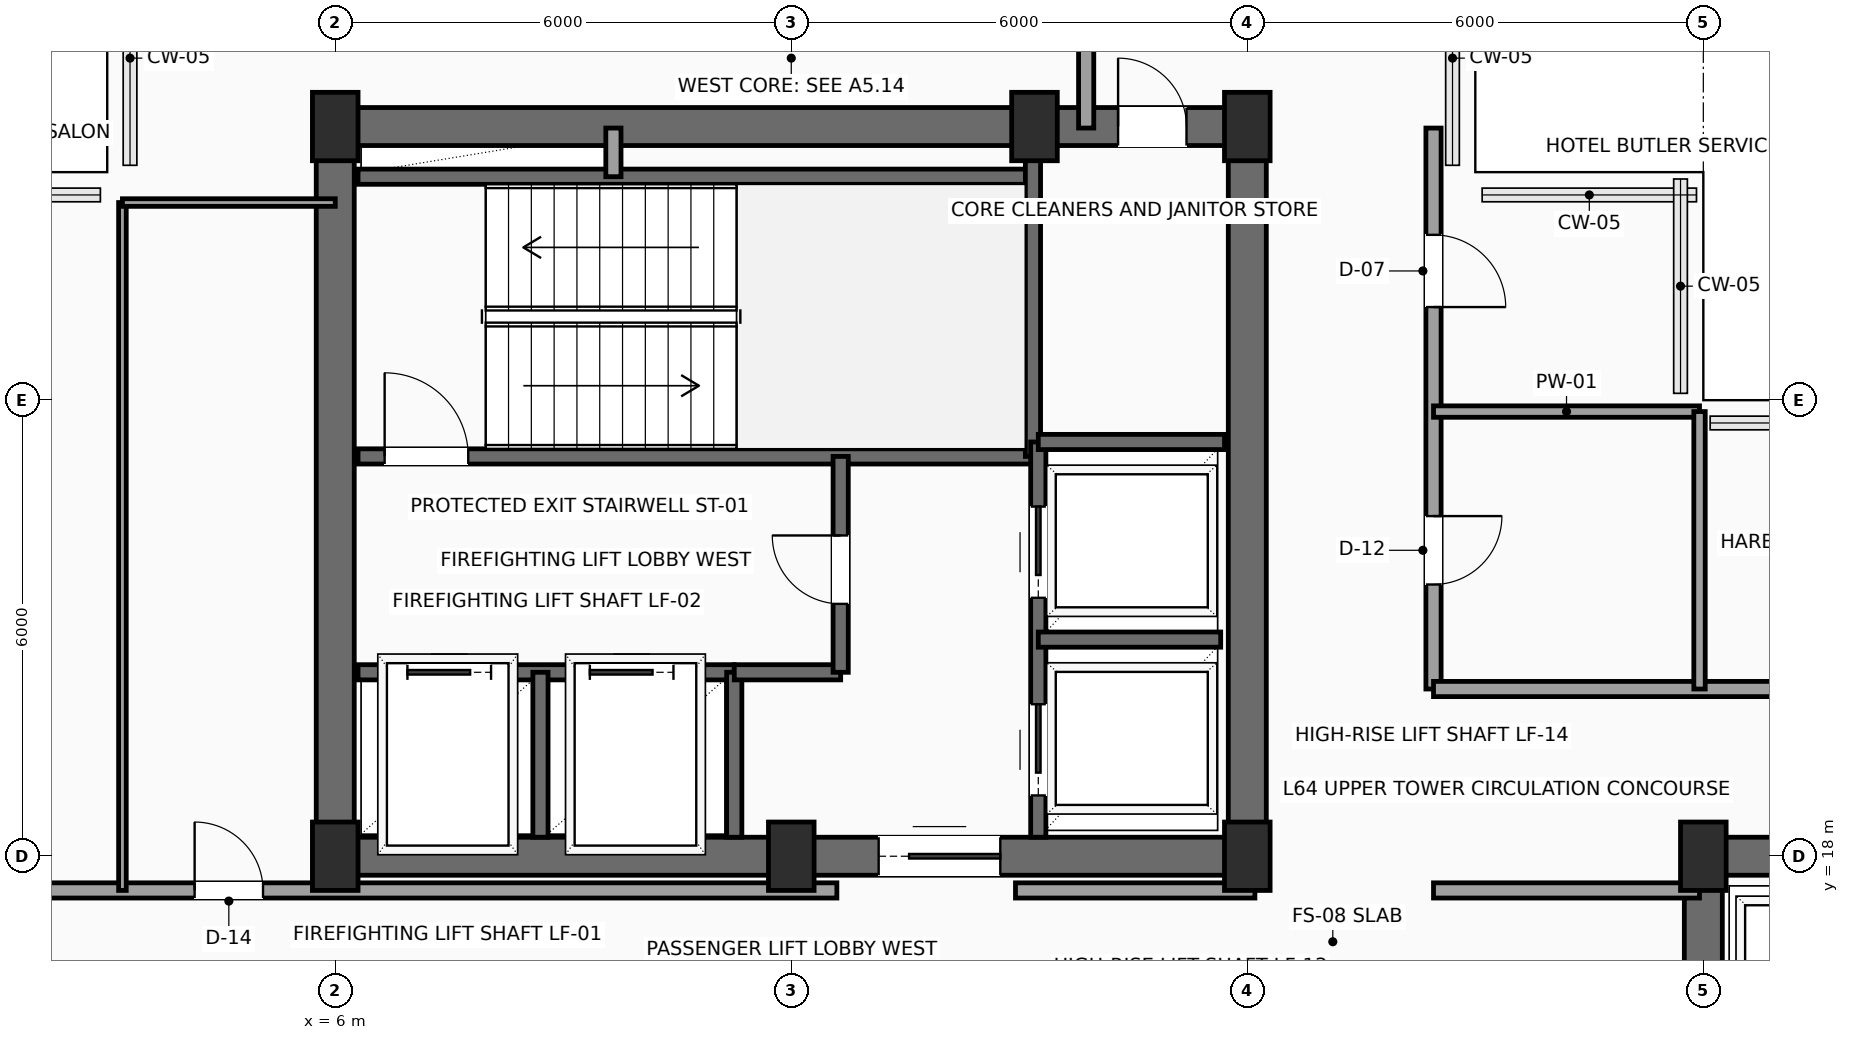
"""IFC4 building model, lengths in metres.
Left out: names, types, materials, properties, quantities, classifications, styles, units other than length and angle.
Written with IfcOpenShell. Run it as: python <this file> out.ifc"""

import sys

from ifc_helpers import new_model, si_unit, direction, frame, frame_2d, origin, origin_2d, place, context, subcontext, project, spatial, rectangle, extrude, element, fill, save


model = new_model("IFC4")
c1 = context("Model", 3, precision=1e-05, world=origin(), true_north=direction((0.0, 1.0)))
c2 = subcontext(c1, "Body", "Model", "MODEL_VIEW")
j1 = project(units=[si_unit("LENGTHUNIT", "METRE"), si_unit("PLANEANGLEUNIT", "RADIAN")], contexts=[c1])
p1 = place(None, origin())
s1 = spatial("IfcSite", under=j1, at=p1, CompositionType="ELEMENT")
p2 = place(p1, origin())
s2 = spatial("IfcBuilding", under=s1, at=p2, CompositionType="ELEMENT")
p3 = place(p2, frame((0.0, 0.0, 257.2)))
s3 = spatial("IfcBuildingStorey", under=s2, at=p3, CompositionType="ELEMENT", Elevation=257.2)
for number, where, z_axis, x_axis in (
    (1, (6.0, 18.0, 0.0), (0.0, 0.0, 1.0), (1.0, 0.0, 0.0)),
    (2, (12.0, 18.0, 0.0), (0.0, 0.0, 1.0), (1.0, 0.0, 0.0)),
    (3, (18.0, 18.0, 0.0), (0.0, 0.0, 1.0), (1.0, 0.0, 0.0)),
    (4, (6.0, 27.6, 0.0), (0.0, 0.0, 1.0), (1.0, 0.0, 0.0)),
    (5, (15.2, 27.6, 0.0), (0.0, 0.0, 1.0), (1.0, 0.0, 0.0)),
    (6, (18.0, 27.6, 0.0), (0.0, 0.0, 1.0), (1.0, 0.0, 0.0)),
    (7, (24.0, 18.0, 0.0), (0.0, 0.0, 1.0), (1.0, 0.0, 0.0)),
):
    element("IfcColumn", number, at=place(p3, frame(where, z_axis=z_axis, x_axis=x_axis)), inside=s3, PredefinedType="COLUMN", context=c2, shape_type="SweptSolid", body=[
        extrude(rectangle(XDim=0.6, YDim=0.9, at=origin_2d()), origin(), (0.0, 0.0, 1.0), 3.5),
    ])
p4 = place(p3, frame((6.0, 18.0, 0.0), z_axis=(0.0, 0.0, 1.0), x_axis=(1.0, 0.0, 0.0)))
e8 = element("IfcWall", 8, at=p4, inside=s3, PredefinedType="SHEAR", context=c2, shape_type="SweptSolid", body=[
    extrude(rectangle(XDim=12.0, YDim=0.5, at=frame_2d((6.0, 0.0))), origin(), (0.0, 0.0, 1.0), 3.3),
])
p5 = place(p4, frame((7.15, 0.0, 0.0)))
e9 = element("IfcOpeningElement", 9, at=p5, cuts=e8, PredefinedType="OPENING", context=c2, shape_type="SweptSolid", body=[
    extrude(rectangle(XDim=1.6, YDim=2.3, at=frame_2d((0.8, 1.15))), frame((0.0, 0.26, 0.0), z_axis=(0.0, -1.0, 0.0), x_axis=(1.0, 0.0, 0.0)), (0.0, 0.0, 1.0), 0.52),
])
p6 = place(p3, frame((6.0, 27.6, 0.0), z_axis=(0.0, 0.0, 1.0), x_axis=(1.0, 0.0, 0.0)))
e10 = element("IfcWall", 10, at=p6, inside=s3, PredefinedType="SHEAR", context=c2, shape_type="SweptSolid", body=[
    extrude(rectangle(XDim=12.0, YDim=0.5, at=frame_2d((6.0, 0.0))), origin(), (0.0, 0.0, 1.0), 3.3),
])
p7 = place(p6, frame((10.3, 0.0, 0.0)))
e11 = element("IfcOpeningElement", 11, at=p7, cuts=e10, PredefinedType="OPENING", context=c2, shape_type="SweptSolid", body=[
    extrude(rectangle(XDim=0.9, YDim=2.15, at=frame_2d((0.45, 1.075))), frame((0.0, 0.26, 0.0), z_axis=(0.0, -1.0, 0.0), x_axis=(1.0, 0.0, 0.0)), (0.0, 0.0, 1.0), 0.52),
])
for number, where, z_axis, x_axis in (
    (12, (6.0, 18.0, 0.0), (0.0, 0.0, 1.0), (0.0, 1.0, 0.0)),
    (13, (18.0, 18.0, 0.0), (0.0, 0.0, 1.0), (0.0, 1.0, 0.0)),
    (14, (24.0, 18.0, 0.0), (0.0, 0.0, 1.0), (1.0, 0.0, 0.0)),
):
    element("IfcWall", number, at=place(p3, frame(where, z_axis=z_axis, x_axis=x_axis)), inside=s3, PredefinedType="SHEAR", context=c2, shape_type="SweptSolid", body=[
        extrude(rectangle(XDim=9.6, YDim=0.5, at=frame_2d((4.8, 0.0))), origin(), (0.0, 0.0, 1.0), 3.3),
    ])
p8 = place(p3, frame((24.0, 6.0, 0.0), z_axis=(0.0, 0.0, 1.0), x_axis=(0.0, 1.0, 0.0)))
e15 = element("IfcWall", 15, at=p8, inside=s3, PredefinedType="SHEAR", context=c2, shape_type="SweptSolid", body=[
    extrude(rectangle(XDim=12.0, YDim=0.5, at=frame_2d((6.0, 0.0))), origin(), (0.0, 0.0, 1.0), 3.3),
])
p9 = place(p8, frame((7.15, 0.0, 0.0)))
e16 = element("IfcOpeningElement", 16, at=p9, cuts=e15, PredefinedType="OPENING", context=c2, shape_type="SweptSolid", body=[
    extrude(rectangle(XDim=1.6, YDim=2.3, at=frame_2d((0.8, 1.15))), frame((0.0, 0.26, 0.0), z_axis=(0.0, -1.0, 0.0), x_axis=(1.0, 0.0, 0.0)), (0.0, 0.0, 1.0), 0.52),
])
p10 = place(p3, frame((6.3, 23.26, 0.0), z_axis=(0.0, 0.0, 1.0), x_axis=(1.0, 0.0, 0.0)))
e17 = element("IfcWall", 17, at=p10, inside=s3, PredefinedType="SHEAR", context=c2, shape_type="SweptSolid", body=[
    extrude(rectangle(XDim=8.88, YDim=0.2, at=frame_2d((4.44, 0.0))), origin(), (0.0, 0.0, 1.0), 3.3),
])
p11 = place(p10, frame((0.35, 0.0, 0.0)))
e18 = element("IfcOpeningElement", 18, at=p11, cuts=e17, PredefinedType="OPENING", context=c2, shape_type="SweptSolid", body=[
    extrude(rectangle(XDim=1.1, YDim=2.2, at=frame_2d((0.55, 1.1))), frame((0.0, 0.11, 0.0), z_axis=(0.0, -1.0, 0.0), x_axis=(1.0, 0.0, 0.0)), (0.0, 0.0, 1.0), 0.22),
])
p12 = place(p3, frame((6.3, 26.94, 0.0), z_axis=(0.0, 0.0, 1.0), x_axis=(1.0, 0.0, 0.0)))
e19 = element("IfcWall", 19, at=p12, inside=s3, PredefinedType="SHEAR", context=c2, shape_type="SweptSolid", body=[
    extrude(rectangle(XDim=8.88, YDim=0.2, at=frame_2d((4.44, 0.0))), origin(), (0.0, 0.0, 1.0), 3.3),
])
p13 = place(p3, frame((15.18, 23.26, 0.0), z_axis=(0.0, 0.0, 1.0), x_axis=(0.0, 1.0, 0.0)))
e20 = element("IfcWall", 20, at=p13, inside=s3, PredefinedType="SHEAR", context=c2, shape_type="SweptSolid", body=[
    extrude(rectangle(XDim=4.04, YDim=0.2, at=frame_2d((2.02, 0.0))), origin(), (0.0, 0.0, 1.0), 3.3),
])
p14 = place(p3, frame((6.3, 20.42, 0.0), z_axis=(0.0, 0.0, 1.0), x_axis=(1.0, 0.0, 0.0)))
e21 = element("IfcWall", 21, at=p14, inside=s3, PredefinedType="SHEAR", context=c2, shape_type="SweptSolid", body=[
    extrude(rectangle(XDim=4.95, YDim=0.2, at=frame_2d((2.475, 0.0))), origin(), (0.0, 0.0, 1.0), 3.3),
])
p15 = place(p14, frame((0.65, 0.0, 0.0)))
e22 = element("IfcOpeningElement", 22, at=p15, cuts=e21, PredefinedType="OPENING", context=c2, shape_type="SweptSolid", body=[
    extrude(rectangle(XDim=1.1, YDim=2.2, at=frame_2d((0.55, 1.1))), frame((0.0, 0.11, 0.0), z_axis=(0.0, -1.0, 0.0), x_axis=(1.0, 0.0, 0.0)), (0.0, 0.0, 1.0), 0.22),
])
p16 = place(p14, frame((3.05, 0.0, 0.0)))
e23 = element("IfcOpeningElement", 23, at=p16, cuts=e21, PredefinedType="OPENING", context=c2, shape_type="SweptSolid", body=[
    extrude(rectangle(XDim=1.1, YDim=2.2, at=frame_2d((0.55, 1.1))), frame((0.0, 0.11, 0.0), z_axis=(0.0, -1.0, 0.0), x_axis=(1.0, 0.0, 0.0)), (0.0, 0.0, 1.0), 0.22),
])
for number, where, z_axis, x_axis in (
    (24, (8.7, 18.25, 0.0), (0.0, 0.0, 1.0), (0.0, 1.0, 0.0)),
    (25, (11.25, 18.25, 0.0), (0.0, 0.0, 1.0), (0.0, 1.0, 0.0)),
):
    element("IfcWall", number, at=place(p3, frame(where, z_axis=z_axis, x_axis=x_axis)), inside=s3, PredefinedType="SHEAR", context=c2, shape_type="SweptSolid", body=[
        extrude(rectangle(XDim=2.17, YDim=0.2, at=frame_2d((1.085, 0.0))), origin(), (0.0, 0.0, 1.0), 3.3),
    ])
p17 = place(p3, frame((11.25, 20.42, 0.0), z_axis=(0.0, 0.0, 1.0), x_axis=(1.0, 0.0, 0.0)))
e26 = element("IfcWall", 26, at=p17, inside=s3, PredefinedType="SHEAR", context=c2, shape_type="SweptSolid", body=[
    extrude(rectangle(XDim=1.4, YDim=0.2, at=frame_2d((0.7, 0.0))), origin(), (0.0, 0.0, 1.0), 3.3),
])
p18 = place(p3, frame((12.65, 20.42, 0.0), z_axis=(0.0, 0.0, 1.0), x_axis=(0.0, 1.0, 0.0)))
e27 = element("IfcWall", 27, at=p18, inside=s3, PredefinedType="SHEAR", context=c2, shape_type="SweptSolid", body=[
    extrude(rectangle(XDim=2.84, YDim=0.2, at=frame_2d((1.42, 0.0))), origin(), (0.0, 0.0, 1.0), 3.3),
])
p19 = place(p18, frame((0.9, 0.0, 0.0)))
e28 = element("IfcOpeningElement", 28, at=p19, cuts=e27, PredefinedType="OPENING", context=c2, shape_type="SweptSolid", body=[
    extrude(rectangle(XDim=0.9, YDim=2.15, at=frame_2d((0.45, 1.075))), frame((0.0, 0.11, 0.0), z_axis=(0.0, -1.0, 0.0), x_axis=(1.0, 0.0, 0.0)), (0.0, 0.0, 1.0), 0.22),
])
p20 = place(p3, frame((9.66, 26.94, 0.0), z_axis=(0.0, 0.0, 1.0), x_axis=(0.0, 1.0, 0.0)))
e29 = element("IfcWall", 29, at=p20, inside=s3, PredefinedType="SOLIDWALL", context=c2, shape_type="SweptSolid", body=[
    extrude(rectangle(XDim=0.64, YDim=0.2, at=frame_2d((0.32, 0.0))), origin(), (0.0, 0.0, 1.0), 3.3),
])
p21 = place(p3, frame((15.25, 18.25, 0.0), z_axis=(0.0, 0.0, 1.0), x_axis=(0.0, 1.0, 0.0)))
e30 = element("IfcWall", 30, at=p21, inside=s3, PredefinedType="SHEAR", context=c2, shape_type="SweptSolid", body=[
    extrude(rectangle(XDim=5.2, YDim=0.2, at=frame_2d((2.6, 0.0))), origin(), (0.0, 0.0, 1.0), 3.3),
])
p22 = place(p21, frame((0.55, 0.0, 0.0)))
e31 = element("IfcOpeningElement", 31, at=p22, cuts=e30, PredefinedType="OPENING", context=c2, shape_type="SweptSolid", body=[
    extrude(rectangle(XDim=1.2, YDim=2.2, at=frame_2d((0.6, 1.1))), frame((0.0, 0.11, 0.0), z_axis=(0.0, -1.0, 0.0), x_axis=(1.0, 0.0, 0.0)), (0.0, 0.0, 1.0), 0.22),
])
p23 = place(p21, frame((3.15, 0.0, 0.0)))
e32 = element("IfcOpeningElement", 32, at=p23, cuts=e30, PredefinedType="OPENING", context=c2, shape_type="SweptSolid", body=[
    extrude(rectangle(XDim=1.2, YDim=2.2, at=frame_2d((0.6, 1.1))), frame((0.0, 0.11, 0.0), z_axis=(0.0, -1.0, 0.0), x_axis=(1.0, 0.0, 0.0)), (0.0, 0.0, 1.0), 0.22),
])
p24 = place(p3, frame((15.25, 20.85, 0.0), z_axis=(0.0, 0.0, 1.0), x_axis=(1.0, 0.0, 0.0)))
e33 = element("IfcWall", 33, at=p24, inside=s3, PredefinedType="SHEAR", context=c2, shape_type="SweptSolid", body=[
    extrude(rectangle(XDim=2.4, YDim=0.2, at=frame_2d((1.2, 0.0))), origin(), (0.0, 0.0, 1.0), 3.3),
])
p25 = place(p3, frame((15.25, 23.45, 0.0), z_axis=(0.0, 0.0, 1.0), x_axis=(1.0, 0.0, 0.0)))
e34 = element("IfcWall", 34, at=p25, inside=s3, PredefinedType="SHEAR", context=c2, shape_type="SweptSolid", body=[
    extrude(rectangle(XDim=2.45, YDim=0.2, at=frame_2d((1.225, 0.0))), origin(), (0.0, 0.0, 1.0), 3.3),
])
p26 = place(p3, frame((0.3, 17.55, 0.0), z_axis=(0.0, 0.0, 1.0), x_axis=(1.0, 0.0, 0.0)))
e35 = element("IfcWall", 35, at=p26, inside=s3, PredefinedType="SOLIDWALL", context=c2, shape_type="SweptSolid", body=[
    extrude(rectangle(XDim=12.3, YDim=0.2, at=frame_2d((6.15, 0.0))), origin(), (0.0, 0.0, 1.0), 3.3),
])
p27 = place(p26, frame((1.025, 0.0, 0.0)))
e36 = element("IfcOpeningElement", 36, at=p27, cuts=e35, PredefinedType="OPENING", context=c2, shape_type="SweptSolid", body=[
    extrude(rectangle(XDim=0.9, YDim=2.1, at=frame_2d((0.45, 1.05))), frame((0.0, 0.11, 0.0), z_axis=(0.0, -1.0, 0.0), x_axis=(1.0, 0.0, 0.0)), (0.0, 0.0, 1.0), 0.22),
])
p28 = place(p26, frame((3.85, 0.0, 0.0)))
e37 = element("IfcOpeningElement", 37, at=p28, cuts=e35, PredefinedType="OPENING", context=c2, shape_type="SweptSolid", body=[
    extrude(rectangle(XDim=0.9, YDim=2.1, at=frame_2d((0.45, 1.05))), frame((0.0, 0.11, 0.0), z_axis=(0.0, -1.0, 0.0), x_axis=(1.0, 0.0, 0.0)), (0.0, 0.0, 1.0), 0.22),
])
p29 = place(p3, frame((14.95, 17.55, 0.0), z_axis=(0.0, 0.0, 1.0), x_axis=(1.0, 0.0, 0.0)))
e38 = element("IfcWall", 38, at=p29, inside=s3, PredefinedType="SOLIDWALL", context=c2, shape_type="SweptSolid", body=[
    extrude(rectangle(XDim=3.15, YDim=0.2, at=frame_2d((1.575, 0.0))), origin(), (0.0, 0.0, 1.0), 3.3),
])
p30 = place(p3, frame((15.88, 27.58, 0.0), z_axis=(0.0, 0.0, 1.0), x_axis=(0.0, 1.0, 0.0)))
e39 = element("IfcWall", 39, at=p30, inside=s3, PredefinedType="SOLIDWALL", context=c2, shape_type="SweptSolid", body=[
    extrude(rectangle(XDim=2.12, YDim=0.2, at=frame_2d((1.06, 0.0))), origin(), (0.0, 0.0, 1.0), 3.3),
])
p31 = place(p3, frame((20.45, 27.58, 0.0), z_axis=(0.0, 0.0, 1.0), x_axis=(0.0, -1.0, 0.0)))
e40 = element("IfcWall", 40, at=p31, inside=s3, PredefinedType="SOLIDWALL", context=c2, shape_type="SweptSolid", body=[
    extrude(rectangle(XDim=7.38, YDim=0.2, at=frame_2d((3.69, 0.0))), origin(), (0.0, 0.0, 1.0), 3.3),
])
p32 = place(p31, frame((5.105, 0.0, 0.0)))
e41 = element("IfcOpeningElement", 41, at=p32, cuts=e40, PredefinedType="OPENING", context=c2, shape_type="SweptSolid", body=[
    extrude(rectangle(XDim=0.9, YDim=2.1, at=frame_2d((0.45, 1.05))), frame((0.0, 0.11, 0.0), z_axis=(0.0, -1.0, 0.0), x_axis=(1.0, 0.0, 0.0)), (0.0, 0.0, 1.0), 0.22),
])
p33 = place(p31, frame((1.405, 0.0, 0.0)))
e42 = element("IfcOpeningElement", 42, at=p33, cuts=e40, PredefinedType="OPENING", context=c2, shape_type="SweptSolid", body=[
    extrude(rectangle(XDim=0.95, YDim=2.15, at=frame_2d((0.475, 1.075))), frame((0.0, 0.11, 0.0), z_axis=(0.0, -1.0, 0.0), x_axis=(1.0, 0.0, 0.0)), (0.0, 0.0, 1.0), 0.22),
])
p34 = place(p3, frame((20.45, 20.2, 0.0), z_axis=(0.0, 0.0, 1.0), x_axis=(1.0, 0.0, 0.0)))
e43 = element("IfcWall", 43, at=p34, inside=s3, PredefinedType="SOLIDWALL", context=c2, shape_type="SweptSolid", body=[
    extrude(rectangle(XDim=13.13, YDim=0.2, at=frame_2d((6.565, 0.0))), origin(), (0.0, 0.0, 1.0), 3.3),
])
p35 = place(p34, frame((7.9, 0.0, 0.0)))
e44 = element("IfcOpeningElement", 44, at=p35, cuts=e43, PredefinedType="OPENING", context=c2, shape_type="SweptSolid", body=[
    extrude(rectangle(XDim=0.9, YDim=2.1, at=frame_2d((0.45, 1.05))), frame((0.0, 0.11, 0.0), z_axis=(0.0, -1.0, 0.0), x_axis=(1.0, 0.0, 0.0)), (0.0, 0.0, 1.0), 0.22),
])
p36 = place(p3, frame((20.45, 17.55, 0.0), z_axis=(0.0, 0.0, 1.0), x_axis=(1.0, 0.0, 0.0)))
e45 = element("IfcWall", 45, at=p36, inside=s3, PredefinedType="SOLIDWALL", context=c2, shape_type="SweptSolid", body=[
    extrude(rectangle(XDim=3.5, YDim=0.2, at=frame_2d((1.75, 0.0))), origin(), (0.0, 0.0, 1.0), 3.3),
])
p37 = place(p3, frame((20.45, 23.85, 0.0), z_axis=(0.0, 0.0, 1.0), x_axis=(1.0, 0.0, 0.0)))
e46 = element("IfcWall", 46, at=p37, inside=s3, PredefinedType="PARTITIONING", context=c2, shape_type="SweptSolid", body=[
    extrude(rectangle(XDim=3.5, YDim=0.15, at=frame_2d((1.75, 0.0))), origin(), (0.0, 0.0, 1.0), 3.3),
])
p38 = place(p3, frame((23.95, 20.2, 0.0), z_axis=(0.0, 0.0, 1.0), x_axis=(0.0, 1.0, 0.0)))
e47 = element("IfcWall", 47, at=p38, inside=s3, PredefinedType="PARTITIONING", context=c2, shape_type="SweptSolid", body=[
    extrude(rectangle(XDim=3.65, YDim=0.15, at=frame_2d((1.825, 0.0))), origin(), (0.0, 0.0, 1.0), 3.3),
])
p39 = place(p3, frame((3.2, 17.55, 0.0), z_axis=(0.0, 0.0, 1.0), x_axis=(0.0, 1.0, 0.0)))
e48 = element("IfcWall", 48, at=p39, inside=s3, PredefinedType="PARTITIONING", context=c2, shape_type="SweptSolid", body=[
    extrude(rectangle(XDim=9.05, YDim=0.1, at=frame_2d((4.525, 0.0))), origin(), (0.0, 0.0, 1.0), 3.3),
])
p40 = place(p3, frame((3.2, 26.6, 0.0), z_axis=(0.0, 0.0, 1.0), x_axis=(1.0, 0.0, 0.0)))
e49 = element("IfcWall", 49, at=p40, inside=s3, PredefinedType="PARTITIONING", context=c2, shape_type="SweptSolid", body=[
    extrude(rectangle(XDim=2.8, YDim=0.1, at=frame_2d((1.4, 0.0))), origin(), (0.0, 0.0, 1.0), 3.3),
])
p41 = place(p5, origin())
e50 = element("IfcDoor", 50, at=p41, inside=s3, OperationType="DOUBLE_DOOR_SLIDING", PredefinedType="DOOR", context=c2, shape_type="SweptSolid", body=[
    extrude(rectangle(XDim=1.6, YDim=2.3, at=frame_2d((0.8, 1.15))), frame((0.0, 0.025, 0.0), z_axis=(0.0, -1.0, 0.0), x_axis=(1.0, 0.0, 0.0)), (0.0, 0.0, 1.0), 0.05),
])
fill(e9, e50)
p42 = place(p7, origin())
e51 = element("IfcDoor", 51, at=p42, inside=s3, OperationType="SINGLE_SWING_LEFT", PredefinedType="DOOR", context=c2, shape_type="SweptSolid", body=[
    extrude(rectangle(XDim=0.9, YDim=2.15, at=frame_2d((0.45, 1.075))), frame((0.0, 0.025, 0.0), z_axis=(0.0, -1.0, 0.0), x_axis=(1.0, 0.0, 0.0)), (0.0, 0.0, 1.0), 0.05),
])
fill(e11, e51)
p43 = place(p11, origin())
e52 = element("IfcDoor", 52, at=p43, inside=s3, OperationType="SINGLE_SWING_LEFT", PredefinedType="DOOR", context=c2, shape_type="SweptSolid", body=[
    extrude(rectangle(XDim=1.1, YDim=2.2, at=frame_2d((0.55, 1.1))), frame((0.0, 0.025, 0.0), z_axis=(0.0, -1.0, 0.0), x_axis=(1.0, 0.0, 0.0)), (0.0, 0.0, 1.0), 0.05),
])
fill(e18, e52)
p44 = place(p15, origin())
e53 = element("IfcDoor", 53, at=p44, inside=s3, OperationType="SLIDING_TO_LEFT", PredefinedType="DOOR", context=c2, shape_type="SweptSolid", body=[
    extrude(rectangle(XDim=1.1, YDim=2.2, at=frame_2d((0.55, 1.1))), frame((0.0, 0.025, 0.0), z_axis=(0.0, -1.0, 0.0), x_axis=(1.0, 0.0, 0.0)), (0.0, 0.0, 1.0), 0.05),
])
fill(e22, e53)
p45 = place(p16, origin())
e54 = element("IfcDoor", 54, at=p45, inside=s3, OperationType="SLIDING_TO_LEFT", PredefinedType="DOOR", context=c2, shape_type="SweptSolid", body=[
    extrude(rectangle(XDim=1.1, YDim=2.2, at=frame_2d((0.55, 1.1))), frame((0.0, 0.025, 0.0), z_axis=(0.0, -1.0, 0.0), x_axis=(1.0, 0.0, 0.0)), (0.0, 0.0, 1.0), 0.05),
])
fill(e23, e54)
p46 = place(p19, origin())
e55 = element("IfcDoor", 55, at=p46, inside=s3, OperationType="SINGLE_SWING_RIGHT", PredefinedType="DOOR", context=c2, shape_type="SweptSolid", body=[
    extrude(rectangle(XDim=0.9, YDim=2.15, at=frame_2d((0.45, 1.075))), frame((0.0, 0.025, 0.0), z_axis=(0.0, -1.0, 0.0), x_axis=(1.0, 0.0, 0.0)), (0.0, 0.0, 1.0), 0.05),
])
fill(e28, e55)
p47 = place(p22, origin())
e56 = element("IfcDoor", 56, at=p47, inside=s3, OperationType="SLIDING_TO_RIGHT", PredefinedType="DOOR", context=c2, shape_type="SweptSolid", body=[
    extrude(rectangle(XDim=1.2, YDim=2.2, at=frame_2d((0.6, 1.1))), frame((0.0, 0.025, 0.0), z_axis=(0.0, -1.0, 0.0), x_axis=(1.0, 0.0, 0.0)), (0.0, 0.0, 1.0), 0.05),
])
fill(e31, e56)
p48 = place(p23, origin())
e57 = element("IfcDoor", 57, at=p48, inside=s3, OperationType="SLIDING_TO_RIGHT", PredefinedType="DOOR", context=c2, shape_type="SweptSolid", body=[
    extrude(rectangle(XDim=1.2, YDim=2.2, at=frame_2d((0.6, 1.1))), frame((0.0, 0.025, 0.0), z_axis=(0.0, -1.0, 0.0), x_axis=(1.0, 0.0, 0.0)), (0.0, 0.0, 1.0), 0.05),
])
fill(e32, e57)
p49 = place(p28, origin())
e58 = element("IfcDoor", 58, at=p49, inside=s3, OperationType="SINGLE_SWING_LEFT", PredefinedType="DOOR", context=c2, shape_type="SweptSolid", body=[
    extrude(rectangle(XDim=0.9, YDim=2.1, at=frame_2d((0.45, 1.05))), frame((0.0, 0.025, 0.0), z_axis=(0.0, -1.0, 0.0), x_axis=(1.0, 0.0, 0.0)), (0.0, 0.0, 1.0), 0.05),
])
fill(e37, e58)
p50 = place(p32, origin())
e59 = element("IfcDoor", 59, at=p50, inside=s3, OperationType="SINGLE_SWING_LEFT", PredefinedType="DOOR", context=c2, shape_type="SweptSolid", body=[
    extrude(rectangle(XDim=0.9, YDim=2.1, at=frame_2d((0.45, 1.05))), frame((0.0, 0.025, 0.0), z_axis=(0.0, -1.0, 0.0), x_axis=(1.0, 0.0, 0.0)), (0.0, 0.0, 1.0), 0.05),
])
fill(e41, e59)
p51 = place(p33, origin())
e60 = element("IfcDoor", 60, at=p51, inside=s3, OperationType="SINGLE_SWING_RIGHT", PredefinedType="DOOR", context=c2, shape_type="SweptSolid", body=[
    extrude(rectangle(XDim=0.95, YDim=2.15, at=frame_2d((0.475, 1.075))), frame((0.0, 0.025, 0.0), z_axis=(0.0, -1.0, 0.0), x_axis=(1.0, 0.0, 0.0)), (0.0, 0.0, 1.0), 0.05),
])
fill(e42, e60)
save(model, sys.argv[1])
